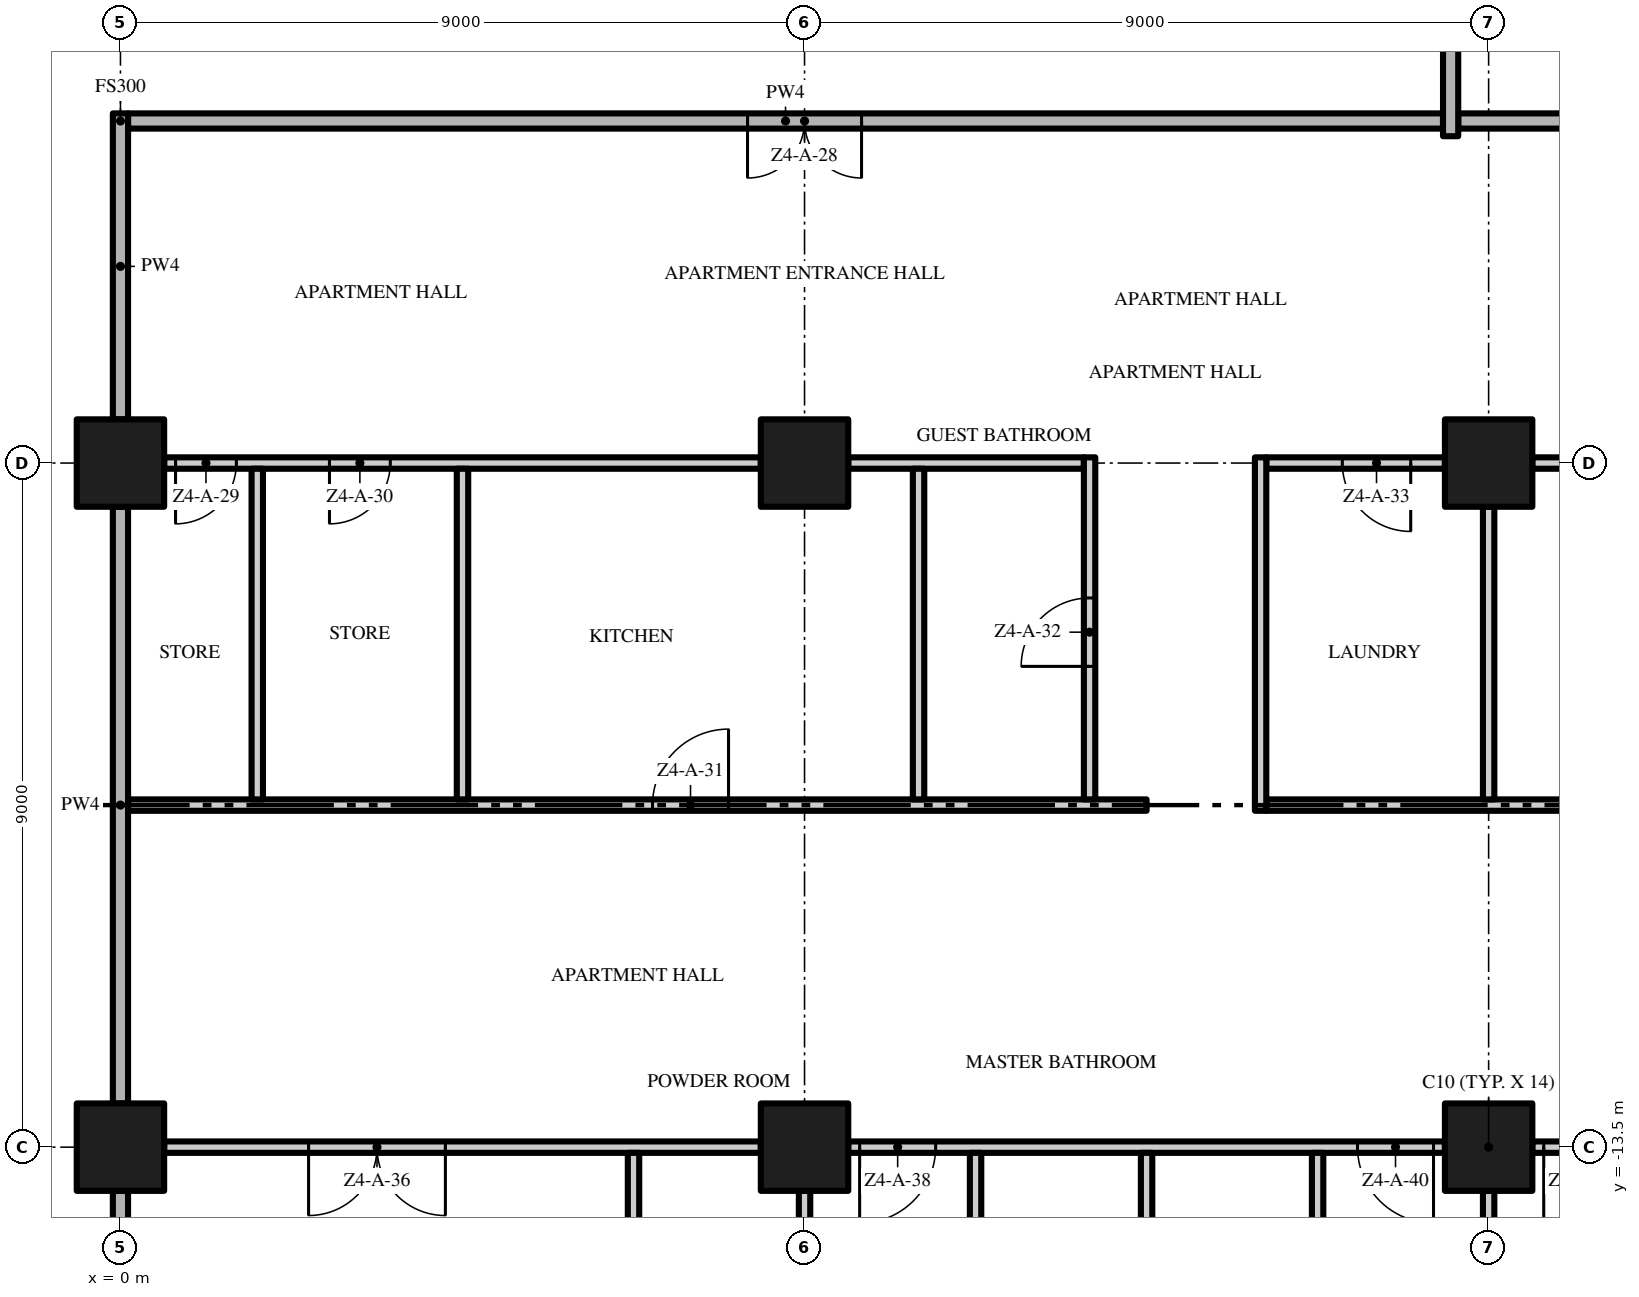
"""IFC4 building model, lengths in metres.
Left out: names, types, materials, properties, quantities, classifications, styles, units other than length and angle.
Written with IfcOpenShell. Run it as: python <this file> out.ifc"""

import sys

from ifc_helpers import new_model, si_unit, direction, frame, frame_2d, origin, origin_2d, place, context, subcontext, project, spatial, rectangle, extrude, element, fill, save


model = new_model("IFC4")
c1 = context("Model", 3, precision=1e-05, world=origin(), true_north=direction((0.0, 1.0)))
c2 = subcontext(c1, "Body", "Model", "MODEL_VIEW")
j1 = project(units=[si_unit("LENGTHUNIT", "METRE"), si_unit("PLANEANGLEUNIT", "RADIAN")], contexts=[c1])
p1 = place(None, origin())
s1 = spatial("IfcSite", under=j1, at=p1, CompositionType="ELEMENT")
p2 = place(p1, origin())
s2 = spatial("IfcBuilding", under=s1, at=p2, CompositionType="ELEMENT")
p3 = place(p2, frame((0.0, 0.0, 192.0)))
s3 = spatial("IfcBuildingStorey", under=s2, at=p3, CompositionType="ELEMENT", Elevation=192.0)
for number, where, z_axis, x_axis in (
    (1, (0.0, -13.5, 0.0), (0.0, 0.0, 1.0), (1.0, 0.0, 0.0)),
    (2, (0.0, -4.5, 0.0), (0.0, 0.0, 1.0), (1.0, 0.0, 0.0)),
    (3, (18.0, -13.5, 0.0), (0.0, 0.0, 1.0), (1.0, 0.0, 0.0)),
    (4, (18.0, -4.5, 0.0), (0.0, 0.0, 1.0), (1.0, 0.0, 0.0)),
    (5, (9.0, -13.5, 0.0), (0.0, 0.0, 1.0), (1.0, 0.0, 0.0)),
    (6, (9.0, -4.5, 0.0), (0.0, 0.0, 1.0), (1.0, 0.0, 0.0)),
):
    element("IfcColumn", number, at=place(p3, frame(where, z_axis=z_axis, x_axis=x_axis)), inside=s3, PredefinedType="COLUMN", context=c2, shape_type="SweptSolid", body=[
        extrude(rectangle(XDim=1.15, YDim=1.15, at=origin_2d()), origin(), (0.0, 0.0, 1.0), 3.5),
    ])
p4 = place(p3, frame((8.425, -13.5, 0.0), z_axis=(0.0, 0.0, 1.0), x_axis=(-1.0, 0.0, 0.0)))
e7 = element("IfcWall", 7, at=p4, inside=s3, PredefinedType="PARTITIONING", context=c2, shape_type="SweptSolid", body=[
    extrude(rectangle(XDim=7.85, YDim=0.15, at=frame_2d((3.925, 0.0))), origin(), (0.0, 0.0, 1.0), 3.5),
])
p5 = place(p4, frame((4.15, 0.0, 0.0)))
e8 = element("IfcOpeningElement", 8, at=p5, cuts=e7, PredefinedType="OPENING", context=c2, shape_type="SweptSolid", body=[
    extrude(rectangle(XDim=1.8, YDim=2.4, at=frame_2d((0.9, 1.2))), frame((0.0, 0.085, 0.0), z_axis=(0.0, -1.0, 0.0), x_axis=(1.0, 0.0, 0.0)), (0.0, 0.0, 1.0), 0.17),
])
p6 = place(p3, frame((17.425, -13.5, 0.0), z_axis=(0.0, 0.0, 1.0), x_axis=(-1.0, 0.0, 0.0)))
e9 = element("IfcWall", 9, at=p6, inside=s3, PredefinedType="PARTITIONING", context=c2, shape_type="SweptSolid", body=[
    extrude(rectangle(XDim=7.85, YDim=0.15, at=frame_2d((3.925, 0.0))), origin(), (0.0, 0.0, 1.0), 3.5),
])
p7 = place(p6, frame((6.7, 0.0, 0.0)))
e10 = element("IfcOpeningElement", 10, at=p7, cuts=e9, PredefinedType="OPENING", context=c2, shape_type="SweptSolid", body=[
    extrude(rectangle(XDim=1.0, YDim=2.4, at=frame_2d((0.5, 1.2))), frame((0.0, 0.085, 0.0), z_axis=(0.0, -1.0, 0.0), x_axis=(1.0, 0.0, 0.0)), (0.0, 0.0, 1.0), 0.17),
])
p8 = place(p6, frame((0.15, 0.0, 0.0)))
e11 = element("IfcOpeningElement", 11, at=p8, cuts=e9, PredefinedType="OPENING", context=c2, shape_type="SweptSolid", body=[
    extrude(rectangle(XDim=1.0, YDim=2.4, at=frame_2d((0.5, 1.2))), frame((0.0, 0.085, 0.0), z_axis=(0.0, -1.0, 0.0), x_axis=(1.0, 0.0, 0.0)), (0.0, 0.0, 1.0), 0.17),
])
p9 = place(p3, frame((25.95, -13.5, 0.0), z_axis=(0.0, 0.0, 1.0), x_axis=(-1.0, 0.0, 0.0)))
e12 = element("IfcWall", 12, at=p9, inside=s3, PredefinedType="PARTITIONING", context=c2, shape_type="SweptSolid", body=[
    extrude(rectangle(XDim=7.375, YDim=0.15, at=frame_2d((3.688, 0.0))), origin(), (0.0, 0.0, 1.0), 3.5),
])
p10 = place(p9, frame((6.225, 0.0, 0.0)))
e13 = element("IfcOpeningElement", 13, at=p10, cuts=e12, PredefinedType="OPENING", context=c2, shape_type="SweptSolid", body=[
    extrude(rectangle(XDim=1.0, YDim=2.4, at=frame_2d((0.5, 1.2))), frame((0.0, 0.085, 0.0), z_axis=(0.0, -1.0, 0.0), x_axis=(1.0, 0.0, 0.0)), (0.0, 0.0, 1.0), 0.17),
])
p11 = place(p9, frame((0.45, 0.0, 0.0)))
e14 = element("IfcOpeningElement", 14, at=p11, cuts=e12, PredefinedType="OPENING", context=c2, shape_type="SweptSolid", body=[
    extrude(rectangle(XDim=1.5, YDim=2.4, at=frame_2d((0.75, 1.2))), frame((0.0, 0.085, 0.0), z_axis=(0.0, -1.0, 0.0), x_axis=(1.0, 0.0, 0.0)), (0.0, 0.0, 1.0), 0.17),
])
p12 = place(p3, frame((0.1, -9.0, 0.0), z_axis=(0.0, 0.0, 1.0), x_axis=(1.0, 0.0, 0.0)))
e15 = element("IfcWall", 15, at=p12, inside=s3, PredefinedType="PARTITIONING", context=c2, shape_type="SweptSolid", body=[
    extrude(rectangle(XDim=13.4, YDim=0.15, at=frame_2d((6.7, 0.0))), origin(), (0.0, 0.0, 1.0), 3.5),
])
p13 = place(p12, frame((6.9, 0.0, 0.0)))
e16 = element("IfcOpeningElement", 16, at=p13, cuts=e15, PredefinedType="OPENING", context=c2, shape_type="SweptSolid", body=[
    extrude(rectangle(XDim=1.0, YDim=2.4, at=frame_2d((0.5, 1.2))), frame((0.0, 0.085, 0.0), z_axis=(0.0, -1.0, 0.0), x_axis=(1.0, 0.0, 0.0)), (0.0, 0.0, 1.0), 0.17),
])
p14 = place(p3, frame((15.075, -9.0, 0.0), z_axis=(0.0, 0.0, 1.0), x_axis=(1.0, 0.0, 0.0)))
e17 = element("IfcWall", 17, at=p14, inside=s3, PredefinedType="PARTITIONING", context=c2, shape_type="SweptSolid", body=[
    extrude(rectangle(XDim=11.625, YDim=0.15, at=frame_2d((5.812, 0.0))), origin(), (0.0, 0.0, 1.0), 3.5),
])
p15 = place(p3, frame((8.425, -4.5, 0.0), z_axis=(0.0, 0.0, 1.0), x_axis=(-1.0, 0.0, 0.0)))
e18 = element("IfcWall", 18, at=p15, inside=s3, PredefinedType="PARTITIONING", context=c2, shape_type="SweptSolid", body=[
    extrude(rectangle(XDim=7.85, YDim=0.15, at=frame_2d((3.925, 0.0))), origin(), (0.0, 0.0, 1.0), 3.5),
])
p16 = place(p15, frame((6.9, 0.0, 0.0)))
e19 = element("IfcOpeningElement", 19, at=p16, cuts=e18, PredefinedType="OPENING", context=c2, shape_type="SweptSolid", body=[
    extrude(rectangle(XDim=0.8, YDim=2.0, at=frame_2d((0.4, 1.0))), frame((0.0, 0.085, 0.0), z_axis=(0.0, -1.0, 0.0), x_axis=(1.0, 0.0, 0.0)), (0.0, 0.0, 1.0), 0.17),
])
p17 = place(p15, frame((4.875, 0.0, 0.0)))
e20 = element("IfcOpeningElement", 20, at=p17, cuts=e18, PredefinedType="OPENING", context=c2, shape_type="SweptSolid", body=[
    extrude(rectangle(XDim=0.8, YDim=2.0, at=frame_2d((0.4, 1.0))), frame((0.0, 0.085, 0.0), z_axis=(0.0, -1.0, 0.0), x_axis=(1.0, 0.0, 0.0)), (0.0, 0.0, 1.0), 0.17),
])
p18 = place(p3, frame((9.575, -4.5, 0.0), z_axis=(0.0, 0.0, 1.0), x_axis=(1.0, 0.0, 0.0)))
e21 = element("IfcWall", 21, at=p18, inside=s3, PredefinedType="PARTITIONING", context=c2, shape_type="SweptSolid", body=[
    extrude(rectangle(XDim=3.1, YDim=0.15, at=frame_2d((1.55, 0.0))), origin(), (0.0, 0.0, 1.0), 3.5),
])
p19 = place(p3, frame((17.425, -4.5, 0.0), z_axis=(0.0, 0.0, 1.0), x_axis=(-1.0, 0.0, 0.0)))
e22 = element("IfcWall", 22, at=p19, inside=s3, PredefinedType="PARTITIONING", context=c2, shape_type="SweptSolid", body=[
    extrude(rectangle(XDim=2.35, YDim=0.15, at=frame_2d((1.175, 0.0))), origin(), (0.0, 0.0, 1.0), 3.5),
])
p20 = place(p19, frame((0.45, 0.0, 0.0)))
e23 = element("IfcOpeningElement", 23, at=p20, cuts=e22, PredefinedType="OPENING", context=c2, shape_type="SweptSolid", body=[
    extrude(rectangle(XDim=0.9, YDim=2.1, at=frame_2d((0.45, 1.05))), frame((0.0, 0.085, 0.0), z_axis=(0.0, -1.0, 0.0), x_axis=(1.0, 0.0, 0.0)), (0.0, 0.0, 1.0), 0.17),
])
p21 = place(p3, frame((25.95, -4.5, 0.0), z_axis=(0.0, 0.0, 1.0), x_axis=(-1.0, 0.0, 0.0)))
e24 = element("IfcWall", 24, at=p21, inside=s3, PredefinedType="PARTITIONING", context=c2, shape_type="SweptSolid", body=[
    extrude(rectangle(XDim=7.375, YDim=0.15, at=frame_2d((3.688, 0.0))), origin(), (0.0, 0.0, 1.0), 3.5),
])
p22 = place(p21, frame((4.875, 0.0, 0.0)))
e25 = element("IfcOpeningElement", 25, at=p22, cuts=e24, PredefinedType="OPENING", context=c2, shape_type="SweptSolid", body=[
    extrude(rectangle(XDim=0.9, YDim=2.1, at=frame_2d((0.45, 1.05))), frame((0.0, 0.085, 0.0), z_axis=(0.0, -1.0, 0.0), x_axis=(1.0, 0.0, 0.0)), (0.0, 0.0, 1.0), 0.17),
])
p23 = place(p3, frame((17.4, 0.0, 0.0), z_axis=(0.0, 0.0, 1.0), x_axis=(-1.0, 0.0, 0.0)))
e26 = element("IfcWall", 26, at=p23, inside=s3, PredefinedType="PARTITIONING", context=c2, shape_type="SweptSolid", body=[
    extrude(rectangle(XDim=17.3, YDim=0.2, at=frame_2d((8.65, 0.0))), origin(), (0.0, 0.0, 1.0), 3.5),
])
p24 = place(p23, frame((7.65, 0.0, 0.0)))
e27 = element("IfcOpeningElement", 27, at=p24, cuts=e26, PredefinedType="OPENING", context=c2, shape_type="SweptSolid", body=[
    extrude(rectangle(XDim=1.5, YDim=2.4, at=frame_2d((0.75, 1.2))), frame((0.0, 0.11, 0.0), z_axis=(0.0, -1.0, 0.0), x_axis=(1.0, 0.0, 0.0)), (0.0, 0.0, 1.0), 0.22),
])
p25 = place(p3, frame((17.6, 0.0, 0.0), z_axis=(0.0, 0.0, 1.0), x_axis=(1.0, 0.0, 0.0)))
e28 = element("IfcWall", 28, at=p25, inside=s3, PredefinedType="PARTITIONING", context=c2, shape_type="SweptSolid", body=[
    extrude(rectangle(XDim=9.1, YDim=0.2, at=frame_2d((4.55, 0.0))), origin(), (0.0, 0.0, 1.0), 3.5),
])
p26 = place(p3, frame((0.0, -21.45, 0.0), z_axis=(0.0, 0.0, 1.0), x_axis=(0.0, 1.0, 0.0)))
e29 = element("IfcWall", 29, at=p26, inside=s3, PredefinedType="PARTITIONING", context=c2, shape_type="SweptSolid", body=[
    extrude(rectangle(XDim=7.375, YDim=0.2, at=frame_2d((3.688, 0.0))), origin(), (0.0, 0.0, 1.0), 3.5),
])
p27 = place(p3, frame((0.0, -12.925, 0.0), z_axis=(0.0, 0.0, 1.0), x_axis=(0.0, 1.0, 0.0)))
e30 = element("IfcWall", 30, at=p27, inside=s3, PredefinedType="PARTITIONING", context=c2, shape_type="SweptSolid", body=[
    extrude(rectangle(XDim=7.85, YDim=0.2, at=frame_2d((3.925, 0.0))), origin(), (0.0, 0.0, 1.0), 3.5),
])
p28 = place(p3, frame((0.0, -3.925, 0.0), z_axis=(0.0, 0.0, 1.0), x_axis=(0.0, 1.0, 0.0)))
e31 = element("IfcWall", 31, at=p28, inside=s3, PredefinedType="PARTITIONING", context=c2, shape_type="SweptSolid", body=[
    extrude(rectangle(XDim=4.025, YDim=0.2, at=frame_2d((2.013, 0.0))), origin(), (0.0, 0.0, 1.0), 3.5),
])
for number, where, z_axis, x_axis in (
    (32, (1.8, -8.925, 0.0), (0.0, 0.0, 1.0), (0.0, 1.0, 0.0)),
    (33, (4.5, -8.925, 0.0), (0.0, 0.0, 1.0), (0.0, 1.0, 0.0)),
):
    element("IfcWall", number, at=place(p3, frame(where, z_axis=z_axis, x_axis=x_axis)), inside=s3, PredefinedType="PARTITIONING", context=c2, shape_type="SweptSolid", body=[
        extrude(rectangle(XDim=4.35, YDim=0.15, at=frame_2d((2.175, 0.0))), origin(), (0.0, 0.0, 1.0), 3.5),
    ])
p29 = place(p3, frame((6.75, -16.575, 0.0), z_axis=(0.0, 0.0, 1.0), x_axis=(0.0, 1.0, 0.0)))
e34 = element("IfcWall", 34, at=p29, inside=s3, PredefinedType="PARTITIONING", context=c2, shape_type="SweptSolid", body=[
    extrude(rectangle(XDim=3.0, YDim=0.15, at=frame_2d((1.5, 0.0))), origin(), (0.0, 0.0, 1.0), 3.5),
])
p30 = place(p3, frame((9.0, -21.45, 0.0), z_axis=(0.0, 0.0, 1.0), x_axis=(0.0, 1.0, 0.0)))
e35 = element("IfcWall", 35, at=p30, inside=s3, PredefinedType="PARTITIONING", context=c2, shape_type="SweptSolid", body=[
    extrude(rectangle(XDim=7.375, YDim=0.15, at=frame_2d((3.688, 0.0))), origin(), (0.0, 0.0, 1.0), 3.5),
])
p31 = place(p3, frame((10.5, -8.925, 0.0), z_axis=(0.0, 0.0, 1.0), x_axis=(0.0, 1.0, 0.0)))
e36 = element("IfcWall", 36, at=p31, inside=s3, PredefinedType="PARTITIONING", context=c2, shape_type="SweptSolid", body=[
    extrude(rectangle(XDim=4.35, YDim=0.15, at=frame_2d((2.175, 0.0))), origin(), (0.0, 0.0, 1.0), 3.5),
])
p32 = place(p3, frame((11.25, -16.575, 0.0), z_axis=(0.0, 0.0, 1.0), x_axis=(0.0, 1.0, 0.0)))
e37 = element("IfcWall", 37, at=p32, inside=s3, PredefinedType="PARTITIONING", context=c2, shape_type="SweptSolid", body=[
    extrude(rectangle(XDim=3.0, YDim=0.15, at=frame_2d((1.5, 0.0))), origin(), (0.0, 0.0, 1.0), 3.5),
])
p33 = place(p3, frame((12.75, -8.925, 0.0), z_axis=(0.0, 0.0, 1.0), x_axis=(0.0, 1.0, 0.0)))
e38 = element("IfcWall", 38, at=p33, inside=s3, PredefinedType="PARTITIONING", context=c2, shape_type="SweptSolid", body=[
    extrude(rectangle(XDim=4.5, YDim=0.15, at=frame_2d((2.25, 0.0))), origin(), (0.0, 0.0, 1.0), 3.5),
])
p34 = place(p33, frame((1.75, 0.0, 0.0)))
e39 = element("IfcOpeningElement", 39, at=p34, cuts=e38, PredefinedType="OPENING", context=c2, shape_type="SweptSolid", body=[
    extrude(rectangle(XDim=0.9, YDim=2.1, at=frame_2d((0.45, 1.05))), frame((0.0, 0.085, 0.0), z_axis=(0.0, -1.0, 0.0), x_axis=(1.0, 0.0, 0.0)), (0.0, 0.0, 1.0), 0.17),
])
p35 = place(p3, frame((13.5, -22.2, 0.0), z_axis=(0.0, 0.0, 1.0), x_axis=(0.0, 1.0, 0.0)))
e40 = element("IfcWall", 40, at=p35, inside=s3, PredefinedType="PARTITIONING", context=c2, shape_type="SweptSolid", body=[
    extrude(rectangle(XDim=8.625, YDim=0.15, at=frame_2d((4.312, 0.0))), origin(), (0.0, 0.0, 1.0), 3.5),
])
p36 = place(p3, frame((15.0, -9.075, 0.0), z_axis=(0.0, 0.0, 1.0), x_axis=(0.0, 1.0, 0.0)))
e41 = element("IfcWall", 41, at=p36, inside=s3, PredefinedType="PARTITIONING", context=c2, shape_type="SweptSolid", body=[
    extrude(rectangle(XDim=4.65, YDim=0.15, at=frame_2d((2.325, 0.0))), origin(), (0.0, 0.0, 1.0), 3.5),
])
p37 = place(p3, frame((15.75, -16.575, 0.0), z_axis=(0.0, 0.0, 1.0), x_axis=(0.0, 1.0, 0.0)))
e42 = element("IfcWall", 42, at=p37, inside=s3, PredefinedType="PARTITIONING", context=c2, shape_type="SweptSolid", body=[
    extrude(rectangle(XDim=3.0, YDim=0.15, at=frame_2d((1.5, 0.0))), origin(), (0.0, 0.0, 1.0), 3.5),
])
p38 = place(p3, frame((17.5, -0.2, 0.0), z_axis=(0.0, 0.0, 1.0), x_axis=(0.0, 1.0, 0.0)))
e43 = element("IfcWall", 43, at=p38, inside=s3, PredefinedType="PARTITIONING", context=c2, shape_type="SweptSolid", body=[
    extrude(rectangle(XDim=4.125, YDim=0.2, at=frame_2d((2.062, 0.0))), origin(), (0.0, 0.0, 1.0), 3.5),
])
p39 = place(p3, frame((18.0, -21.45, 0.0), z_axis=(0.0, 0.0, 1.0), x_axis=(0.0, 1.0, 0.0)))
e44 = element("IfcWall", 44, at=p39, inside=s3, PredefinedType="PARTITIONING", context=c2, shape_type="SweptSolid", body=[
    extrude(rectangle(XDim=7.375, YDim=0.15, at=frame_2d((3.688, 0.0))), origin(), (0.0, 0.0, 1.0), 3.5),
])
p40 = place(p3, frame((18.0, -8.925, 0.0), z_axis=(0.0, 0.0, 1.0), x_axis=(0.0, 1.0, 0.0)))
e45 = element("IfcWall", 45, at=p40, inside=s3, PredefinedType="PARTITIONING", context=c2, shape_type="SweptSolid", body=[
    extrude(rectangle(XDim=3.85, YDim=0.15, at=frame_2d((1.925, 0.0))), origin(), (0.0, 0.0, 1.0), 3.5),
])
p41 = place(p24, origin())
e46 = element("IfcDoor", 46, at=p41, inside=s3, OperationType="DOUBLE_DOOR_SINGLE_SWING", PredefinedType="DOOR", context=c2, shape_type="SweptSolid", body=[
    extrude(rectangle(XDim=1.5, YDim=2.4, at=frame_2d((0.75, 1.2))), frame((0.0, 0.025, 0.0), z_axis=(0.0, -1.0, 0.0), x_axis=(1.0, 0.0, 0.0)), (0.0, 0.0, 1.0), 0.05),
])
fill(e27, e46)
p42 = place(p16, origin())
e47 = element("IfcDoor", 47, at=p42, inside=s3, OperationType="SINGLE_SWING_RIGHT", PredefinedType="DOOR", context=c2, shape_type="SweptSolid", body=[
    extrude(rectangle(XDim=0.8, YDim=2.0, at=frame_2d((0.4, 1.0))), frame((0.0, 0.025, 0.0), z_axis=(0.0, -1.0, 0.0), x_axis=(1.0, 0.0, 0.0)), (0.0, 0.0, 1.0), 0.05),
])
fill(e19, e47)
p43 = place(p17, origin())
e48 = element("IfcDoor", 48, at=p43, inside=s3, OperationType="SINGLE_SWING_RIGHT", PredefinedType="DOOR", context=c2, shape_type="SweptSolid", body=[
    extrude(rectangle(XDim=0.8, YDim=2.0, at=frame_2d((0.4, 1.0))), frame((0.0, 0.025, 0.0), z_axis=(0.0, -1.0, 0.0), x_axis=(1.0, 0.0, 0.0)), (0.0, 0.0, 1.0), 0.05),
])
fill(e20, e48)
p44 = place(p13, origin())
e49 = element("IfcDoor", 49, at=p44, inside=s3, OperationType="SINGLE_SWING_RIGHT", PredefinedType="DOOR", context=c2, shape_type="SweptSolid", body=[
    extrude(rectangle(XDim=1.0, YDim=2.4, at=frame_2d((0.5, 1.2))), frame((0.0, 0.025, 0.0), z_axis=(0.0, -1.0, 0.0), x_axis=(1.0, 0.0, 0.0)), (0.0, 0.0, 1.0), 0.05),
])
fill(e16, e49)
p45 = place(p34, origin())
e50 = element("IfcDoor", 50, at=p45, inside=s3, OperationType="SINGLE_SWING_LEFT", PredefinedType="DOOR", context=c2, shape_type="SweptSolid", body=[
    extrude(rectangle(XDim=0.9, YDim=2.1, at=frame_2d((0.45, 1.05))), frame((0.0, 0.025, 0.0), z_axis=(0.0, -1.0, 0.0), x_axis=(1.0, 0.0, 0.0)), (0.0, 0.0, 1.0), 0.05),
])
fill(e39, e50)
p46 = place(p20, origin())
e51 = element("IfcDoor", 51, at=p46, inside=s3, OperationType="SINGLE_SWING_LEFT", PredefinedType="DOOR", context=c2, shape_type="SweptSolid", body=[
    extrude(rectangle(XDim=0.9, YDim=2.1, at=frame_2d((0.45, 1.05))), frame((0.0, 0.025, 0.0), z_axis=(0.0, -1.0, 0.0), x_axis=(1.0, 0.0, 0.0)), (0.0, 0.0, 1.0), 0.05),
])
fill(e23, e51)
p47 = place(p5, origin())
e52 = element("IfcDoor", 52, at=p47, inside=s3, OperationType="DOUBLE_DOOR_SINGLE_SWING", PredefinedType="DOOR", context=c2, shape_type="SweptSolid", body=[
    extrude(rectangle(XDim=1.8, YDim=2.4, at=frame_2d((0.9, 1.2))), frame((0.0, 0.025, 0.0), z_axis=(0.0, -1.0, 0.0), x_axis=(1.0, 0.0, 0.0)), (0.0, 0.0, 1.0), 0.05),
])
fill(e8, e52)
p48 = place(p7, origin())
e53 = element("IfcDoor", 53, at=p48, inside=s3, OperationType="SINGLE_SWING_RIGHT", PredefinedType="DOOR", context=c2, shape_type="SweptSolid", body=[
    extrude(rectangle(XDim=1.0, YDim=2.4, at=frame_2d((0.5, 1.2))), frame((0.0, 0.025, 0.0), z_axis=(0.0, -1.0, 0.0), x_axis=(1.0, 0.0, 0.0)), (0.0, 0.0, 1.0), 0.05),
])
fill(e10, e53)
p49 = place(p8, origin())
e54 = element("IfcDoor", 54, at=p49, inside=s3, OperationType="SINGLE_SWING_LEFT", PredefinedType="DOOR", context=c2, shape_type="SweptSolid", body=[
    extrude(rectangle(XDim=1.0, YDim=2.4, at=frame_2d((0.5, 1.2))), frame((0.0, 0.025, 0.0), z_axis=(0.0, -1.0, 0.0), x_axis=(1.0, 0.0, 0.0)), (0.0, 0.0, 1.0), 0.05),
])
fill(e11, e54)
p50 = place(p10, origin())
e55 = element("IfcDoor", 55, at=p50, inside=s3, OperationType="SINGLE_SWING_RIGHT", PredefinedType="DOOR", context=c2, shape_type="SweptSolid", body=[
    extrude(rectangle(XDim=1.0, YDim=2.4, at=frame_2d((0.5, 1.2))), frame((0.0, 0.025, 0.0), z_axis=(0.0, -1.0, 0.0), x_axis=(1.0, 0.0, 0.0)), (0.0, 0.0, 1.0), 0.05),
])
fill(e13, e55)
save(model, sys.argv[1])
